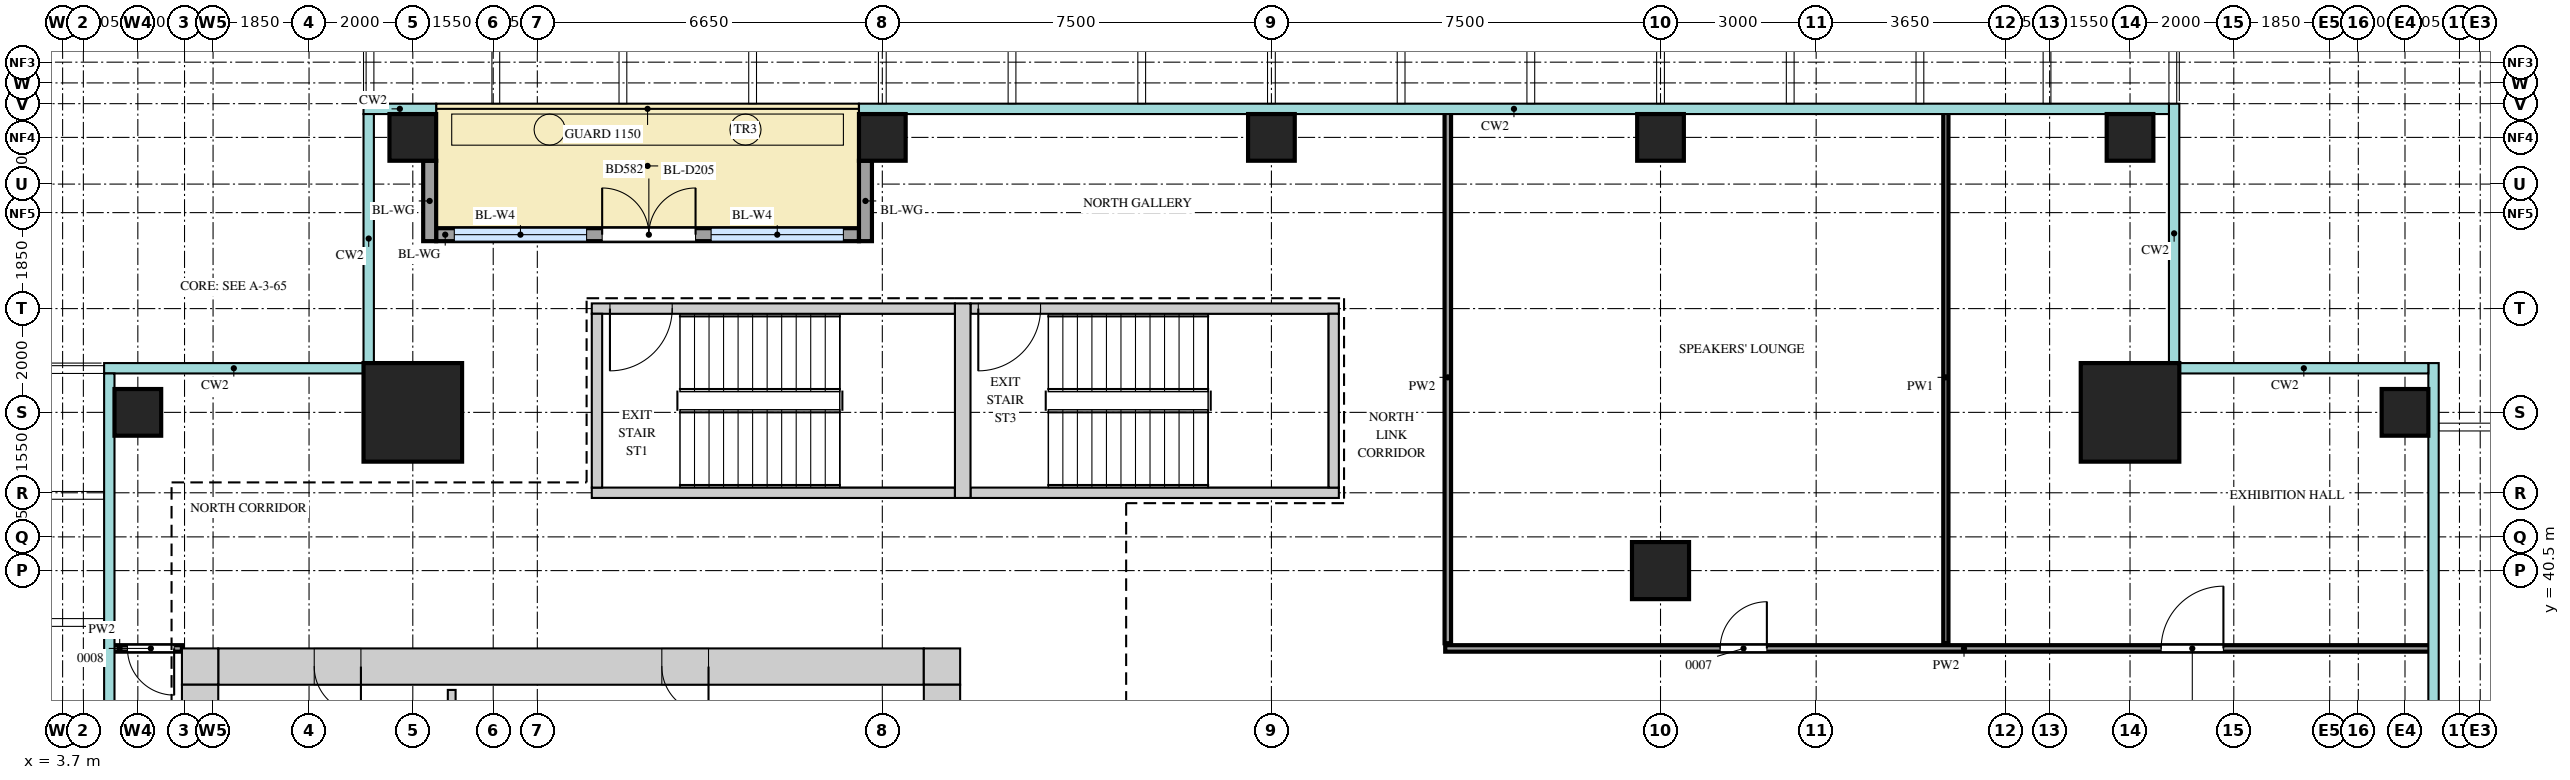
"""IFC4 building model, lengths in metres.
Left out: names, types, materials, properties, quantities, classifications, styles, units other than length and angle.
Written with IfcOpenShell. Run it as: python <this file> out.ifc"""

import sys

from ifc_helpers import new_model, si_unit, direction, frame, frame_2d, origin, origin_2d, place, context, subcontext, project, spatial, rectangle, extrude, source, transform, mapped, element, fill, save


model = new_model("IFC4")
c1 = context("Model", 3, precision=1e-05, world=origin(), true_north=direction((0.0, 1.0)))
c2 = subcontext(c1, "Body", "Model", "MODEL_VIEW")
j1 = project(units=[si_unit("LENGTHUNIT", "METRE"), si_unit("PLANEANGLEUNIT", "RADIAN")], contexts=[c1])
p1 = place(None, origin())
s1 = spatial("IfcSite", under=j1, at=p1, CompositionType="ELEMENT")
p2 = place(p1, origin())
s2 = spatial("IfcBuilding", under=s1, at=p2, CompositionType="ELEMENT")
p3 = place(p2, frame((0.0, 0.0, 258.2)))
s3 = spatial("IfcBuildingStorey", under=s2, at=p3, CompositionType="ELEMENT", Elevation=258.2)
m1 = source(origin(), c2, "Body", "SweptSolid", [
    extrude(rectangle(XDim=13.6, YDim=0.7, at=frame_2d((6.8, 0.0))), origin(), (0.0, 0.0, 1.0), 3.75),
])
p4 = place(p3, frame((6.7, 38.65, 0.0), z_axis=(0.0, 0.0, 1.0), x_axis=(1.0, 0.0, 0.0)))
e1 = element("IfcWall", 1, at=p4, inside=s3, PredefinedType="SHEAR", context=c2, shape_type="MappedRepresentation", body=[
    mapped(m1, transform((0.0, 0.0, 0.0))),
])
m2 = source(origin(), c2, "Body", "SweptSolid", [
    extrude(rectangle(XDim=0.9, YDim=2.1, at=frame_2d((0.45, 1.05))), frame((0.0, 0.36, 0.0), z_axis=(0.0, -1.0, 0.0), x_axis=(1.0, 0.0, 0.0)), (0.0, 0.0, 1.0), 0.72),
])
p5 = place(p4, frame((1.85, 0.0, 0.0)))
e2 = element("IfcOpeningElement", 2, at=p5, cuts=e1, PredefinedType="OPENING", context=c2, shape_type="MappedRepresentation", body=[
    mapped(m2, transform((0.0, 0.0, 0.0))),
])
p6 = place(p4, frame((8.55, 0.0, 0.0)))
e3 = element("IfcOpeningElement", 3, at=p6, cuts=e1, PredefinedType="OPENING", context=c2, shape_type="MappedRepresentation", body=[
    mapped(m2, transform((0.0, 0.0, 0.0))),
])
m3 = source(origin(), c2, "Body", "SweptSolid", [
    extrude(rectangle(XDim=0.7, YDim=0.7, at=frame_2d((0.35, 0.0))), origin(), (0.0, 0.0, 1.0), 3.75),
])
for number, where, z_axis, x_axis in (
    (4, (20.3, 38.65, 0.0), (0.0, 0.0, 1.0), (1.0, 0.0, 0.0)),
    (5, (6.0, 38.65, 0.0), (0.0, 0.0, 1.0), (1.0, 0.0, 0.0)),
):
    element("IfcWall", number, at=place(p3, frame(where, z_axis=z_axis, x_axis=x_axis)), inside=s3, PredefinedType="SHEAR", context=c2, shape_type="MappedRepresentation", body=[
        mapped(m3, transform((0.0, 0.0, 0.0))),
    ])
m4 = source(origin(), c2, "Body", "SweptSolid", [
    extrude(rectangle(XDim=22.6, YDim=0.7, at=frame_2d((11.3, 0.0))), origin(), (0.0, 0.0, 1.0), 3.75),
])
p7 = place(p3, frame((20.65, 15.7, 0.0), z_axis=(0.0, 0.0, 1.0), x_axis=(0.0, 1.0, 0.0)))
e6 = element("IfcWall", 6, at=p7, inside=s3, PredefinedType="SHEAR", context=c2, shape_type="MappedRepresentation", body=[
    mapped(m4, transform((0.0, 0.0, 0.0))),
])
m5 = source(origin(), c2, "Body", "SweptSolid", [
    extrude(rectangle(XDim=1.8, YDim=2.1, at=frame_2d((0.9, 1.05))), frame((0.0, 0.36, 0.0), z_axis=(0.0, -1.0, 0.0), x_axis=(1.0, 0.0, 0.0)), (0.0, 0.0, 1.0), 0.72),
])
p8 = place(p7, frame((10.8, 0.0, 0.0)))
e7 = element("IfcOpeningElement", 7, at=p8, cuts=e6, PredefinedType="OPENING", context=c2, shape_type="MappedRepresentation", body=[
    mapped(m5, transform((0.0, 0.0, 0.0))),
])
p9 = place(p7, frame((0.45, 0.0, 0.0)))
e8 = element("IfcOpeningElement", 8, at=p9, cuts=e6, PredefinedType="OPENING", context=c2, shape_type="MappedRepresentation", body=[
    mapped(m2, transform((0.0, 0.0, 0.0))),
])
p10 = place(p7, frame((2.25, 0.0, 0.0)))
e9 = element("IfcOpeningElement", 9, at=p10, cuts=e6, PredefinedType="OPENING", context=c2, shape_type="MappedRepresentation", body=[
    mapped(m2, transform((0.0, 0.0, 0.0))),
])
m6 = source(origin(), c2, "Body", "SweptSolid", [
    extrude(rectangle(XDim=1.0, YDim=2.1, at=frame_2d((0.5, 1.05))), frame((0.0, 0.36, 0.0), z_axis=(0.0, -1.0, 0.0), x_axis=(1.0, 0.0, 0.0)), (0.0, 0.0, 1.0), 0.72),
])
p11 = place(p7, frame((4.95, 0.0, 0.0)))
e10 = element("IfcOpeningElement", 10, at=p11, cuts=e6, PredefinedType="OPENING", context=c2, shape_type="MappedRepresentation", body=[
    mapped(m6, transform((0.0, 0.0, 0.0))),
])
p12 = place(p3, frame((6.35, 15.7, 0.0), z_axis=(0.0, 0.0, 1.0), x_axis=(0.0, 1.0, 0.0)))
e11 = element("IfcWall", 11, at=p12, inside=s3, PredefinedType="SHEAR", context=c2, shape_type="MappedRepresentation", body=[
    mapped(m4, transform((0.0, 0.0, 0.0))),
])
m7 = source(origin(), c2, "Body", "SweptSolid", [
    extrude(rectangle(XDim=7.0, YDim=0.2, at=frame_2d((3.5, 0.0))), origin(), (0.0, 0.0, 1.0), 3.75),
])
p13 = place(p3, frame((13.9, 45.55, 0.0), z_axis=(0.0, 0.0, 1.0), x_axis=(1.0, 0.0, 0.0)))
e12 = element("IfcWall", 12, at=p13, inside=s3, PredefinedType="SHEAR", context=c2, shape_type="MappedRepresentation", body=[
    mapped(m7, transform((0.0, 0.0, 0.0))),
])
m8 = source(origin(), c2, "Body", "SweptSolid", [
    extrude(rectangle(XDim=1.2, YDim=2.1, at=frame_2d((0.6, 1.05))), frame((0.0, 0.11, 0.0), z_axis=(0.0, -1.0, 0.0), x_axis=(1.0, 0.0, 0.0)), (0.0, 0.0, 1.0), 0.22),
])
p14 = place(p13, frame((0.35, 0.0, 0.0)))
e13 = element("IfcOpeningElement", 13, at=p14, cuts=e12, PredefinedType="OPENING", context=c2, shape_type="MappedRepresentation", body=[
    mapped(m8, transform((0.0, 0.0, 0.0))),
])
p15 = place(p3, frame((13.9, 42.0, 0.0), z_axis=(0.0, 0.0, 1.0), x_axis=(1.0, 0.0, 0.0)))
e14 = element("IfcWall", 14, at=p15, inside=s3, PredefinedType="SHEAR", context=c2, shape_type="MappedRepresentation", body=[
    mapped(m7, transform((0.0, 0.0, 0.0))),
])
m9 = source(origin(), c2, "Body", "SweptSolid", [
    extrude(rectangle(XDim=7.1, YDim=0.2, at=frame_2d((3.55, 0.0))), origin(), (0.0, 0.0, 1.0), 3.75),
])
p16 = place(p3, frame((21.2, 45.55, 0.0), z_axis=(0.0, 0.0, 1.0), x_axis=(1.0, 0.0, 0.0)))
e15 = element("IfcWall", 15, at=p16, inside=s3, PredefinedType="SHEAR", context=c2, shape_type="MappedRepresentation", body=[
    mapped(m9, transform((0.0, 0.0, 0.0))),
])
p17 = place(p16, frame((0.15, 0.0, 0.0)))
e16 = element("IfcOpeningElement", 16, at=p17, cuts=e15, PredefinedType="OPENING", context=c2, shape_type="MappedRepresentation", body=[
    mapped(m8, transform((0.0, 0.0, 0.0))),
])
p18 = place(p3, frame((21.2, 42.0, 0.0), z_axis=(0.0, 0.0, 1.0), x_axis=(1.0, 0.0, 0.0)))
e17 = element("IfcWall", 17, at=p18, inside=s3, PredefinedType="SHEAR", context=c2, shape_type="MappedRepresentation", body=[
    mapped(m9, transform((0.0, 0.0, 0.0))),
])
m10 = source(origin(), c2, "Body", "SweptSolid", [
    extrude(rectangle(XDim=3.75, YDim=0.3, at=frame_2d((1.875, 0.0))), origin(), (0.0, 0.0, 1.0), 3.75),
])
p19 = place(p3, frame((21.05, 41.9, 0.0), z_axis=(0.0, 0.0, 1.0), x_axis=(0.0, 1.0, 0.0)))
e18 = element("IfcWall", 18, at=p19, inside=s3, PredefinedType="SHEAR", context=c2, shape_type="MappedRepresentation", body=[
    mapped(m10, transform((0.0, 0.0, 0.0))),
])
m11 = source(origin(), c2, "Body", "SweptSolid", [
    extrude(rectangle(XDim=3.35, YDim=0.2, at=frame_2d((1.675, 0.0))), origin(), (0.0, 0.0, 1.0), 3.75),
])
for number, where, z_axis, x_axis in (
    (19, (14.0, 42.1, 0.0), (0.0, 0.0, 1.0), (0.0, 1.0, 0.0)),
    (20, (28.2, 42.1, 0.0), (0.0, 0.0, 1.0), (0.0, 1.0, 0.0)),
):
    element("IfcWall", number, at=place(p3, frame(where, z_axis=z_axis, x_axis=x_axis)), inside=s3, PredefinedType="SHEAR", context=c2, shape_type="MappedRepresentation", body=[
        mapped(m11, transform((0.0, 0.0, 0.0))),
    ])
m12 = source(origin(), c2, "Body", "SweptSolid", [
    extrude(rectangle(XDim=1.9, YDim=1.9, at=origin_2d()), origin(), (0.0, 0.0, 1.0), 4.0),
])
for number, where, z_axis, x_axis in (
    (21, (43.55, 43.55, 0.0), (0.0, 0.0, 1.0), (1.0, 0.0, 0.0)),
    (22, (10.45, 43.55, 0.0), (0.0, 0.0, 1.0), (1.0, 0.0, 0.0)),
):
    element("IfcColumn", number, at=place(p3, frame(where, z_axis=z_axis, x_axis=x_axis)), inside=s3, PredefinedType="COLUMN", context=c2, shape_type="MappedRepresentation", body=[
        mapped(m12, transform((0.0, 0.0, 0.0))),
    ])
m13 = source(origin(), c2, "Body", "SweptSolid", [
    extrude(rectangle(XDim=0.9, YDim=0.9, at=origin_2d()), origin(), (0.0, 0.0, 1.0), 3.75),
])
for number, where, z_axis, x_axis in (
    (23, (48.85, 43.55, 0.0), (0.0, 0.0, 1.0), (1.0, 0.0, 0.0)),
    (24, (10.45, 48.85, 0.0), (0.0, 0.0, 1.0), (1.0, 0.0, 0.0)),
    (25, (19.5, 48.85, 0.0), (0.0, 0.0, 1.0), (1.0, 0.0, 0.0)),
    (26, (27.0, 48.85, 0.0), (0.0, 0.0, 1.0), (1.0, 0.0, 0.0)),
    (27, (34.5, 48.85, 0.0), (0.0, 0.0, 1.0), (1.0, 0.0, 0.0)),
    (28, (43.55, 48.85, 0.0), (0.0, 0.0, 1.0), (1.0, 0.0, 0.0)),
    (29, (5.15, 43.55, 0.0), (0.0, 0.0, 1.0), (1.0, 0.0, 0.0)),
):
    element("IfcColumn", number, at=place(p3, frame(where, z_axis=z_axis, x_axis=x_axis)), inside=s3, PredefinedType="COLUMN", context=c2, shape_type="MappedRepresentation", body=[
        mapped(m13, transform((0.0, 0.0, 0.0))),
    ])
m14 = source(origin(), c2, "Body", "SweptSolid", [
    extrude(rectangle(XDim=1.1, YDim=1.1, at=origin_2d()), origin(), (0.0, 0.0, 1.0), 3.75),
])
p20 = place(p3, frame((34.5, 40.5, 0.0), z_axis=(0.0, 0.0, 1.0), x_axis=(1.0, 0.0, 0.0)))
e30 = element("IfcColumn", 30, at=p20, inside=s3, PredefinedType="COLUMN", context=c2, shape_type="MappedRepresentation", body=[
    mapped(m14, transform((0.0, 0.0, 0.0))),
])
m15 = source(origin(), c2, "Body", "SweptSolid", [
    extrude(rectangle(XDim=8.15, YDim=0.25, at=frame_2d((4.075, 0.0))), origin(), (0.0, 0.0, 1.0), 3.35),
])
p21 = place(p3, frame((10.9, 46.975, 0.0), z_axis=(0.0, 0.0, 1.0), x_axis=(1.0, 0.0, 0.0)))
e31 = element("IfcWall", 31, at=p21, inside=s3, PredefinedType="SOLIDWALL", context=c2, shape_type="MappedRepresentation", body=[
    mapped(m15, transform((0.0, 0.0, 0.0))),
])
m16 = source(origin(), c2, "Body", "SweptSolid", [
    extrude(rectangle(XDim=2.55, YDim=2.4, at=frame_2d((1.275, 1.2))), frame((0.0, 0.135, 0.0), z_axis=(0.0, -1.0, 0.0), x_axis=(1.0, 0.0, 0.0)), (0.0, 0.0, 1.0), 0.27),
])
p22 = place(p21, frame((0.35, 0.0, 0.0)))
e32 = element("IfcOpeningElement", 32, at=p22, cuts=e31, PredefinedType="OPENING", context=c2, shape_type="MappedRepresentation", body=[
    mapped(m16, transform((0.0, 0.0, 0.0))),
])
p23 = place(p21, frame((5.3, 0.0, 0.0)))
e33 = element("IfcOpeningElement", 33, at=p23, cuts=e31, PredefinedType="OPENING", context=c2, shape_type="MappedRepresentation", body=[
    mapped(m16, transform((0.0, 0.0, 0.0))),
])
m17 = source(origin(), c2, "Body", "SweptSolid", [
    extrude(rectangle(XDim=1.8, YDim=2.4, at=frame_2d((0.9, 1.2))), frame((0.0, 0.135, 0.0), z_axis=(0.0, -1.0, 0.0), x_axis=(1.0, 0.0, 0.0)), (0.0, 0.0, 1.0), 0.27),
])
p24 = place(p21, frame((3.2, 0.0, 0.0)))
e34 = element("IfcOpeningElement", 34, at=p24, cuts=e31, PredefinedType="OPENING", context=c2, shape_type="MappedRepresentation", body=[
    mapped(m17, transform((0.0, 0.0, 0.0))),
])
m18 = source(origin(), c2, "Body", "SweptSolid", [
    extrude(rectangle(XDim=1.55, YDim=0.25, at=frame_2d((0.775, 0.0))), origin(), (0.0, 0.0, 1.0), 3.35),
])
for number, where, z_axis, x_axis in (
    (35, (10.775, 48.4, 0.0), (0.0, 0.0, 1.0), (0.0, -1.0, 0.0)),
    (36, (19.175, 48.4, 0.0), (0.0, 0.0, 1.0), (0.0, -1.0, 0.0)),
):
    element("IfcWall", number, at=place(p3, frame(where, z_axis=z_axis, x_axis=x_axis)), inside=s3, PredefinedType="SOLIDWALL", context=c2, shape_type="MappedRepresentation", body=[
        mapped(m18, transform((0.0, 0.0, 0.0))),
    ])
m19 = source(origin(), c2, "Body", "SweptSolid", [
    extrude(rectangle(XDim=6.0, YDim=0.15, at=frame_2d((3.0, 0.0))), origin(), (0.0, 0.0, 1.0), 3.8),
])
p25 = place(p3, frame((11.2, 32.2, 0.0), z_axis=(0.0, 0.0, 1.0), x_axis=(0.0, 1.0, 0.0)))
e37 = element("IfcWall", 37, at=p25, inside=s3, PredefinedType="PARTITIONING", context=c2, shape_type="MappedRepresentation", body=[
    mapped(m19, transform((0.0, 0.0, 0.0))),
])
m20 = source(origin(), c2, "Body", "SweptSolid", [
    extrude(rectangle(XDim=1.35, YDim=0.125, at=frame_2d((0.675, 0.0))), origin(), (0.0, 0.0, 1.0), 3.8),
])
p26 = place(p3, frame((4.65, 39.0, 0.0), z_axis=(0.0, 0.0, 1.0), x_axis=(1.0, 0.0, 0.0)))
e38 = element("IfcWall", 38, at=p26, inside=s3, PredefinedType="PARTITIONING", context=c2, shape_type="MappedRepresentation", body=[
    mapped(m20, transform((0.0, 0.0, 0.0))),
])
m21 = source(origin(), c2, "Body", "SweptSolid", [
    extrude(rectangle(XDim=0.9, YDim=2.1, at=frame_2d((0.45, 1.05))), frame((0.0, 0.073, 0.0), z_axis=(0.0, -1.0, 0.0), x_axis=(1.0, 0.0, 0.0)), (0.0, 0.0, 1.0), 0.145),
])
p27 = place(p26, frame((0.3, 0.0, 0.0)))
e39 = element("IfcOpeningElement", 39, at=p27, cuts=e38, PredefinedType="OPENING", context=c2, shape_type="MappedRepresentation", body=[
    mapped(m21, transform((0.0, 0.0, 0.0))),
])
m22 = source(origin(), c2, "Body", "SweptSolid", [
    extrude(rectangle(XDim=19.0, YDim=0.125, at=frame_2d((9.5, 0.0))), origin(), (0.0, 0.0, 1.0), 3.8),
])
p28 = place(p3, frame((30.35, 39.0, 0.0), z_axis=(0.0, 0.0, 1.0), x_axis=(1.0, 0.0, 0.0)))
e40 = element("IfcWall", 40, at=p28, inside=s3, PredefinedType="PARTITIONING", context=c2, shape_type="MappedRepresentation", body=[
    mapped(m22, transform((0.0, 0.0, 0.0))),
])
p29 = place(p28, frame((5.3, 0.0, 0.0)))
e41 = element("IfcOpeningElement", 41, at=p29, cuts=e40, PredefinedType="OPENING", context=c2, shape_type="MappedRepresentation", body=[
    mapped(m21, transform((0.0, 0.0, 0.0))),
])
m23 = source(origin(), c2, "Body", "SweptSolid", [
    extrude(rectangle(XDim=1.2, YDim=2.1, at=frame_2d((0.6, 1.05))), frame((0.0, 0.073, 0.0), z_axis=(0.0, -1.0, 0.0), x_axis=(1.0, 0.0, 0.0)), (0.0, 0.0, 1.0), 0.145),
])
p30 = place(p28, frame((13.8, 0.0, 0.0)))
e42 = element("IfcOpeningElement", 42, at=p30, cuts=e40, PredefinedType="OPENING", context=c2, shape_type="MappedRepresentation", body=[
    mapped(m23, transform((0.0, 0.0, 0.0))),
])
m24 = source(origin(), c2, "Body", "SweptSolid", [
    extrude(rectangle(XDim=10.25, YDim=0.125, at=frame_2d((5.125, 0.0))), origin(), (0.0, 0.0, 1.0), 3.8),
])
p31 = place(p3, frame((30.4, 39.1, 0.0), z_axis=(0.0, 0.0, 1.0), x_axis=(0.0, 1.0, 0.0)))
e43 = element("IfcWall", 43, at=p31, inside=s3, PredefinedType="PARTITIONING", context=c2, shape_type="MappedRepresentation", body=[
    mapped(m24, transform((0.0, 0.0, 0.0))),
])
m25 = source(origin(), c2, "Body", "SweptSolid", [
    extrude(rectangle(XDim=10.25, YDim=0.1, at=frame_2d((5.125, 0.0))), origin(), (0.0, 0.0, 1.0), 3.8),
])
p32 = place(p3, frame((40.0, 39.1, 0.0), z_axis=(0.0, 0.0, 1.0), x_axis=(0.0, 1.0, 0.0)))
e44 = element("IfcWall", 44, at=p32, inside=s3, PredefinedType="PARTITIONING", context=c2, shape_type="MappedRepresentation", body=[
    mapped(m25, transform((0.0, 0.0, 0.0))),
])
m26 = source(origin(), c2, "Body", "SweptSolid", [
    extrude(rectangle(XDim=2.55, YDim=2.4, at=frame_2d((1.275, 1.2))), frame((0.0, 0.03, 0.0), z_axis=(0.0, -1.0, 0.0), x_axis=(1.0, 0.0, 0.0)), (0.0, 0.0, 1.0), 0.06),
])
p33 = place(p22, origin())
e45 = element("IfcWindow", 45, at=p33, inside=s3, PartitioningType="SINGLE_PANEL", PredefinedType="WINDOW", context=c2, shape_type="MappedRepresentation", body=[
    mapped(m26, transform((0.0, 0.0, 0.0))),
])
fill(e32, e45)
p34 = place(p23, origin())
e46 = element("IfcWindow", 46, at=p34, inside=s3, PartitioningType="SINGLE_PANEL", PredefinedType="WINDOW", context=c2, shape_type="MappedRepresentation", body=[
    mapped(m26, transform((0.0, 0.0, 0.0))),
])
fill(e33, e46)
m27 = source(origin(), c2, "Body", "SweptSolid", [
    extrude(rectangle(XDim=1.8, YDim=2.4, at=frame_2d((0.9, 1.2))), frame((0.0, 0.025, 0.0), z_axis=(0.0, -1.0, 0.0), x_axis=(1.0, 0.0, 0.0)), (0.0, 0.0, 1.0), 0.05),
])
p35 = place(p24, origin())
e47 = element("IfcDoor", 47, at=p35, inside=s3, OperationType="DOUBLE_DOOR_DOUBLE_SWING", PredefinedType="DOOR", context=c2, shape_type="MappedRepresentation", body=[
    mapped(m27, transform((0.0, 0.0, 0.0))),
])
fill(e34, e47)
m28 = source(origin(), c2, "Body", "SweptSolid", [
    extrude(rectangle(XDim=0.9, YDim=2.1, at=frame_2d((0.45, 1.05))), frame((0.0, 0.3, 0.0), z_axis=(0.0, -1.0, 0.0), x_axis=(1.0, 0.0, 0.0)), (0.0, 0.0, 1.0), 0.6),
])
p36 = place(p5, origin())
e48 = element("IfcDoor", 48, at=p36, inside=s3, OperationType="SINGLE_SWING_RIGHT", PredefinedType="DOOR", context=c2, shape_type="MappedRepresentation", body=[
    mapped(m28, transform((0.0, 0.0, 0.0))),
])
fill(e2, e48)
p37 = place(p6, origin())
e49 = element("IfcDoor", 49, at=p37, inside=s3, OperationType="SINGLE_SWING_RIGHT", PredefinedType="DOOR", context=c2, shape_type="MappedRepresentation", body=[
    mapped(m28, transform((0.0, 0.0, 0.0))),
])
fill(e3, e49)
m29 = source(origin(), c2, "Body", "SweptSolid", [
    extrude(rectangle(XDim=0.9, YDim=2.1, at=frame_2d((0.45, 1.05))), frame((0.0, 0.025, 0.0), z_axis=(0.0, -1.0, 0.0), x_axis=(1.0, 0.0, 0.0)), (0.0, 0.0, 1.0), 0.05),
])
p38 = place(p27, origin())
e50 = element("IfcDoor", 50, at=p38, inside=s3, OperationType="SINGLE_SWING_RIGHT", PredefinedType="DOOR", context=c2, shape_type="MappedRepresentation", body=[
    mapped(m29, transform((0.0, 0.0, 0.0))),
])
fill(e39, e50)
p39 = place(p29, origin())
e51 = element("IfcDoor", 51, at=p39, inside=s3, OperationType="SINGLE_SWING_LEFT", PredefinedType="DOOR", context=c2, shape_type="MappedRepresentation", body=[
    mapped(m29, transform((0.0, 0.0, 0.0))),
])
fill(e41, e51)
m30 = source(origin(), c2, "Body", "SweptSolid", [
    extrude(rectangle(XDim=1.2, YDim=2.1, at=frame_2d((0.6, 1.05))), frame((0.0, 0.025, 0.0), z_axis=(0.0, -1.0, 0.0), x_axis=(1.0, 0.0, 0.0)), (0.0, 0.0, 1.0), 0.05),
])
p40 = place(p30, origin())
e52 = element("IfcDoor", 52, at=p40, inside=s3, OperationType="SINGLE_SWING_LEFT", PredefinedType="DOOR", context=c2, shape_type="MappedRepresentation", body=[
    mapped(m30, transform((0.0, 0.0, 0.0))),
])
fill(e42, e52)
p41 = place(p14, origin())
e53 = element("IfcDoor", 53, at=p41, inside=s3, OperationType="SINGLE_SWING_LEFT", PredefinedType="DOOR", context=c2, shape_type="MappedRepresentation", body=[
    mapped(m30, transform((0.0, 0.0, 0.0))),
])
fill(e13, e53)
p42 = place(p17, origin())
e54 = element("IfcDoor", 54, at=p42, inside=s3, OperationType="SINGLE_SWING_LEFT", PredefinedType="DOOR", context=c2, shape_type="MappedRepresentation", body=[
    mapped(m30, transform((0.0, 0.0, 0.0))),
])
fill(e16, e54)
save(model, sys.argv[1])
